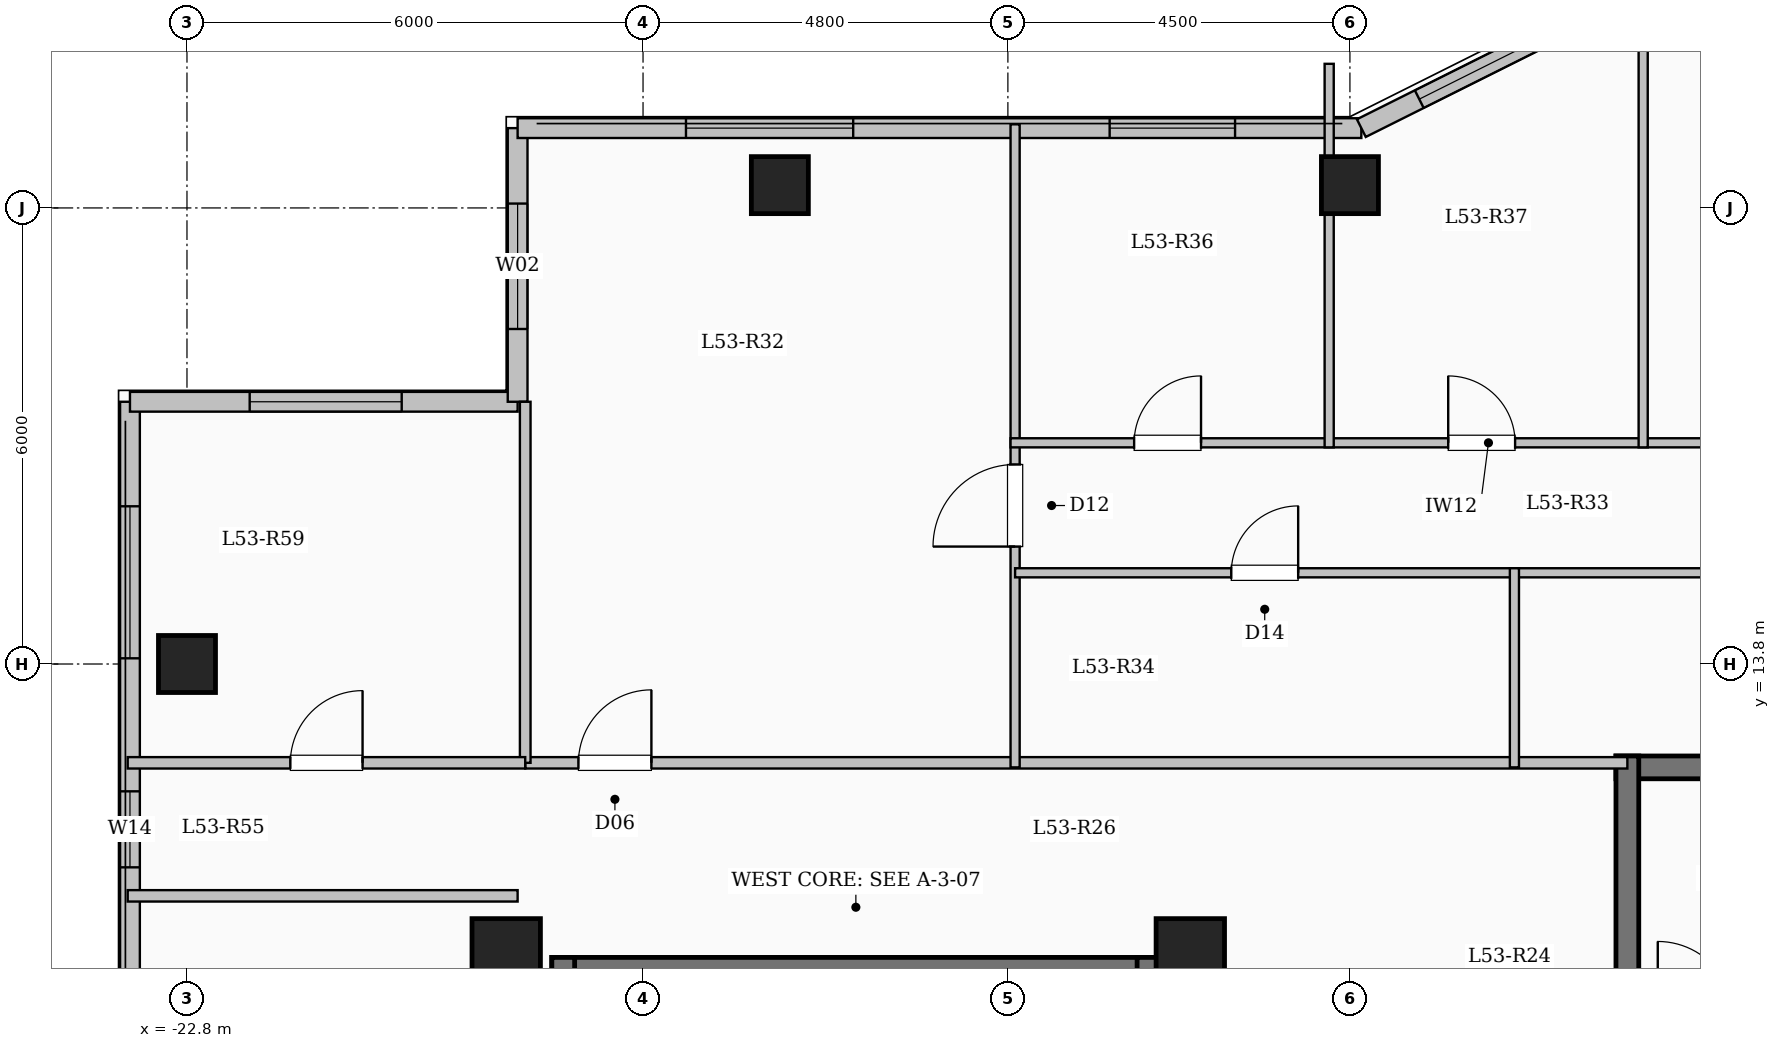
"""IFC4 building model, lengths in metres.
Left out: names, types, materials, properties, quantities, classifications, styles, units other than length and angle.
Written with IfcOpenShell. Run it as: python <this file> out.ifc"""

import sys

from ifc_helpers import new_model, si_unit, direction, frame, frame_2d, origin, origin_2d, place, context, subcontext, project, spatial, rectangle, extrude, element, fill, save


model = new_model("IFC4")
c1 = context("Model", 3, precision=1e-05, world=origin(), true_north=direction((0.0, 1.0)))
c2 = subcontext(c1, "Body", "Model", "MODEL_VIEW")
j1 = project(units=[si_unit("LENGTHUNIT", "METRE"), si_unit("PLANEANGLEUNIT", "RADIAN")], contexts=[c1])
p1 = place(None, origin())
s1 = spatial("IfcSite", under=j1, at=p1, CompositionType="ELEMENT")
p2 = place(p1, origin())
s2 = spatial("IfcBuilding", under=s1, at=p2, CompositionType="ELEMENT")
p3 = place(p2, frame((0.0, 0.0, 196.95)))
s3 = spatial("IfcBuildingStorey", under=s2, at=p3, CompositionType="ELEMENT", Elevation=196.95)
for number, where, z_axis, x_axis in (
    (1, (-9.6, 10.0, 0.0), (0.0, 0.0, 1.0), (1.0, 0.0, 0.0)),
    (2, (-18.6, 10.0, 0.0), (0.0, 0.0, 1.0), (1.0, 0.0, 0.0)),
):
    element("IfcColumn", number, at=place(p3, frame(where, z_axis=z_axis, x_axis=x_axis)), inside=s3, PredefinedType="COLUMN", context=c2, shape_type="SweptSolid", body=[
        extrude(rectangle(XDim=0.9, YDim=0.9, at=origin_2d()), origin(), (0.0, 0.0, 1.0), 3.35),
    ])
for number, where, z_axis, x_axis in (
    (3, (-15.0, 20.1, 0.0), (0.0, 0.0, 1.0), (1.0, 0.0, 0.0)),
    (4, (-7.5, 20.1, 0.0), (0.0, 0.0, 1.0), (1.0, 0.0, 0.0)),
    (5, (-22.8, 13.8, 0.0), (0.0, 0.0, 1.0), (1.0, 0.0, 0.0)),
):
    element("IfcColumn", number, at=place(p3, frame(where, z_axis=z_axis, x_axis=x_axis)), inside=s3, PredefinedType="COLUMN", context=c2, shape_type="SweptSolid", body=[
        extrude(rectangle(XDim=0.75, YDim=0.75, at=origin_2d()), origin(), (0.0, 0.0, 1.0), 3.35),
    ])
p4 = place(p3, frame((-23.55, -17.25, 0.0), z_axis=(0.0, 0.0, 1.0), x_axis=(0.0, 1.0, 0.0)))
e6 = element("IfcWall", 6, at=p4, inside=s3, PredefinedType="SOLIDWALL", context=c2, shape_type="SweptSolid", body=[
    extrude(rectangle(XDim=34.5, YDim=0.26, at=frame_2d((17.25, 0.0))), origin(), (0.0, 0.0, 1.0), 3.1),
])
p5 = place(p4, frame((2.825, 0.0, 0.9)))
e7 = element("IfcOpeningElement", 7, at=p5, cuts=e6, PredefinedType="OPENING", context=c2, shape_type="SweptSolid", body=[
    extrude(rectangle(XDim=2.2, YDim=1.75, at=frame_2d((1.1, 0.875))), frame((0.0, 0.14, 0.0), z_axis=(0.0, -1.0, 0.0), x_axis=(1.0, 0.0, 0.0)), (0.0, 0.0, 1.0), 0.28),
])
p6 = place(p4, frame((8.325, 0.0, 0.95)))
e8 = element("IfcOpeningElement", 8, at=p6, cuts=e6, PredefinedType="OPENING", context=c2, shape_type="SweptSolid", body=[
    extrude(rectangle(XDim=1.2, YDim=1.5, at=frame_2d((0.6, 0.75))), frame((0.0, 0.14, 0.0), z_axis=(0.0, -1.0, 0.0), x_axis=(1.0, 0.0, 0.0)), (0.0, 0.0, 1.0), 0.28),
])
p7 = place(p4, frame((18.0, 0.0, 0.9)))
e9 = element("IfcOpeningElement", 9, at=p7, cuts=e6, PredefinedType="OPENING", context=c2, shape_type="SweptSolid", body=[
    extrude(rectangle(XDim=2.0, YDim=1.7, at=frame_2d((1.0, 0.85))), frame((0.0, 0.14, 0.0), z_axis=(0.0, -1.0, 0.0), x_axis=(1.0, 0.0, 0.0)), (0.0, 0.0, 1.0), 0.28),
])
p8 = place(p4, frame((28.375, 0.0, 0.95)))
e10 = element("IfcOpeningElement", 10, at=p8, cuts=e6, PredefinedType="OPENING", context=c2, shape_type="SweptSolid", body=[
    extrude(rectangle(XDim=1.0, YDim=1.5, at=frame_2d((0.5, 0.75))), frame((0.0, 0.14, 0.0), z_axis=(0.0, -1.0, 0.0), x_axis=(1.0, 0.0, 0.0)), (0.0, 0.0, 1.0), 0.28),
])
p9 = place(p4, frame((31.125, 0.0, 0.9)))
e11 = element("IfcOpeningElement", 11, at=p9, cuts=e6, PredefinedType="OPENING", context=c2, shape_type="SweptSolid", body=[
    extrude(rectangle(XDim=2.0, YDim=1.7, at=frame_2d((1.0, 0.85))), frame((0.0, 0.14, 0.0), z_axis=(0.0, -1.0, 0.0), x_axis=(1.0, 0.0, 0.0)), (0.0, 0.0, 1.0), 0.28),
])
p10 = place(p3, frame((-23.55, 17.25, 0.0), z_axis=(0.0, 0.0, 1.0), x_axis=(1.0, 0.0, 0.0)))
e12 = element("IfcWall", 12, at=p10, inside=s3, PredefinedType="SOLIDWALL", context=c2, shape_type="SweptSolid", body=[
    extrude(rectangle(XDim=5.1, YDim=0.26, at=frame_2d((2.55, 0.0))), origin(), (0.0, 0.0, 1.0), 3.1),
])
p11 = place(p10, frame((1.575, 0.0, 0.9)))
e13 = element("IfcOpeningElement", 13, at=p11, cuts=e12, PredefinedType="OPENING", context=c2, shape_type="SweptSolid", body=[
    extrude(rectangle(XDim=2.0, YDim=1.7, at=frame_2d((1.0, 0.85))), frame((0.0, 0.14, 0.0), z_axis=(0.0, -1.0, 0.0), x_axis=(1.0, 0.0, 0.0)), (0.0, 0.0, 1.0), 0.28),
])
p12 = place(p3, frame((-18.45, 17.25, 0.0), z_axis=(0.0, 0.0, 1.0), x_axis=(0.0, 1.0, 0.0)))
e14 = element("IfcWall", 14, at=p12, inside=s3, PredefinedType="SOLIDWALL", context=c2, shape_type="SweptSolid", body=[
    extrude(rectangle(XDim=3.6, YDim=0.26, at=frame_2d((1.8, 0.0))), origin(), (0.0, 0.0, 1.0), 3.1),
])
p13 = place(p12, frame((0.958, 0.0, 0.9)))
e15 = element("IfcOpeningElement", 15, at=p13, cuts=e14, PredefinedType="OPENING", context=c2, shape_type="SweptSolid", body=[
    extrude(rectangle(XDim=1.65, YDim=1.6, at=frame_2d((0.825, 0.8))), frame((0.0, 0.14, 0.0), z_axis=(0.0, -1.0, 0.0), x_axis=(1.0, 0.0, 0.0)), (0.0, 0.0, 1.0), 0.28),
])
p14 = place(p3, frame((-18.45, 20.85, 0.0), z_axis=(0.0, 0.0, 1.0), x_axis=(1.0, 0.0, 0.0)))
e16 = element("IfcWall", 16, at=p14, inside=s3, PredefinedType="SOLIDWALL", context=c2, shape_type="SweptSolid", body=[
    extrude(rectangle(XDim=11.1, YDim=0.26, at=frame_2d((5.55, 0.0))), origin(), (0.0, 0.0, 1.0), 3.1),
])
p15 = place(p14, frame((2.215, 0.0, 0.9)))
e17 = element("IfcOpeningElement", 17, at=p15, cuts=e16, PredefinedType="OPENING", context=c2, shape_type="SweptSolid", body=[
    extrude(rectangle(XDim=2.2, YDim=1.75, at=frame_2d((1.1, 0.875))), frame((0.0, 0.14, 0.0), z_axis=(0.0, -1.0, 0.0), x_axis=(1.0, 0.0, 0.0)), (0.0, 0.0, 1.0), 0.28),
])
p16 = place(p14, frame((7.789, 0.0, 0.9)))
e18 = element("IfcOpeningElement", 18, at=p16, cuts=e16, PredefinedType="OPENING", context=c2, shape_type="SweptSolid", body=[
    extrude(rectangle(XDim=1.65, YDim=1.6, at=frame_2d((0.825, 0.8))), frame((0.0, 0.14, 0.0), z_axis=(0.0, -1.0, 0.0), x_axis=(1.0, 0.0, 0.0)), (0.0, 0.0, 1.0), 0.28),
])
p17 = place(p3, frame((-7.35, 20.85, 0.0), z_axis=(0.0, 0.0, 1.0), x_axis=(0.894427191, 0.4472135955, 0.0)))
e19 = element("IfcWall", 19, at=p17, inside=s3, PredefinedType="SOLIDWALL", context=c2, shape_type="SweptSolid", body=[
    extrude(rectangle(XDim=3.354, YDim=0.26, at=frame_2d((1.677, 0.0))), origin(), (0.0, 0.0, 1.0), 3.1),
])
p18 = place(p17, frame((0.852, 0.0, 0.9)))
e20 = element("IfcOpeningElement", 20, at=p18, cuts=e19, PredefinedType="OPENING", context=c2, shape_type="SweptSolid", body=[
    extrude(rectangle(XDim=1.65, YDim=1.6, at=frame_2d((0.825, 0.8))), frame((0.0, 0.14, 0.0), z_axis=(0.0, -1.0, 0.0), x_axis=(1.0, 0.0, 0.0)), (0.0, 0.0, 1.0), 0.28),
])
p19 = place(p3, frame((-18.0, 9.79, 0.0), z_axis=(0.0, 0.0, 1.0), x_axis=(1.0, 0.0, 0.0)))
e21 = element("IfcWall", 21, at=p19, inside=s3, PredefinedType="SHEAR", context=c2, shape_type="SweptSolid", body=[
    extrude(rectangle(XDim=8.0, YDim=0.3, at=frame_2d((4.0, 0.0))), origin(), (0.0, 0.0, 1.0), 3.35),
])
for number, where, z_axis, x_axis in (
    (22, (-17.85, 6.35, 0.0), (0.0, 0.0, 1.0), (0.0, 1.0, 0.0)),
    (23, (-10.15, 6.35, 0.0), (0.0, 0.0, 1.0), (0.0, 1.0, 0.0)),
):
    element("IfcWall", number, at=place(p3, frame(where, z_axis=z_axis, x_axis=x_axis)), inside=s3, PredefinedType="SHEAR", context=c2, shape_type="SweptSolid", body=[
        extrude(rectangle(XDim=3.59, YDim=0.3, at=frame_2d((1.795, 0.0))), origin(), (0.0, 0.0, 1.0), 3.35),
    ])
p20 = place(p3, frame((-4.0, 12.44, 0.0), z_axis=(0.0, 0.0, 1.0), x_axis=(1.0, 0.0, 0.0)))
e24 = element("IfcWall", 24, at=p20, inside=s3, PredefinedType="SHEAR", context=c2, shape_type="SweptSolid", body=[
    extrude(rectangle(XDim=8.0, YDim=0.3, at=frame_2d((4.0, 0.0))), origin(), (0.0, 0.0, 1.0), 3.35),
])
p21 = place(p3, frame((-3.85, 9.0, 0.0), z_axis=(0.0, 0.0, 1.0), x_axis=(0.0, 1.0, 0.0)))
e25 = element("IfcWall", 25, at=p21, inside=s3, PredefinedType="SHEAR", context=c2, shape_type="SweptSolid", body=[
    extrude(rectangle(XDim=3.59, YDim=0.3, at=frame_2d((1.795, 0.0))), origin(), (0.0, 0.0, 1.0), 3.35),
])
p22 = place(p3, frame((-18.35, 12.5, 0.0), z_axis=(0.0, 0.0, 1.0), x_axis=(1.0, 0.0, 0.0)))
e26 = element("IfcWall", 26, at=p22, inside=s3, PredefinedType="PARTITIONING", context=c2, shape_type="SweptSolid", body=[
    extrude(rectangle(XDim=14.5, YDim=0.15, at=frame_2d((7.25, 0.0))), origin(), (0.0, 0.0, 1.0), 3.1),
])
p23 = place(p22, frame((0.7, 0.0, 0.0)))
e27 = element("IfcOpeningElement", 27, at=p23, cuts=e26, PredefinedType="OPENING", context=c2, shape_type="SweptSolid", body=[
    extrude(rectangle(XDim=0.96, YDim=2.15, at=frame_2d((0.48, 1.075))), frame((0.0, 0.085, 0.0), z_axis=(0.0, -1.0, 0.0), x_axis=(1.0, 0.0, 0.0)), (0.0, 0.0, 1.0), 0.17),
])
p24 = place(p3, frame((-11.905, 12.44, 0.0), z_axis=(0.0, 0.0, 1.0), x_axis=(0.0, 1.0, 0.0)))
e28 = element("IfcWall", 28, at=p24, inside=s3, PredefinedType="PARTITIONING", context=c2, shape_type="SweptSolid", body=[
    extrude(rectangle(XDim=8.46, YDim=0.12, at=frame_2d((4.23, 0.0))), origin(), (0.0, 0.0, 1.0), 3.1),
])
p25 = place(p24, frame((2.905, 0.0, 0.0)))
e29 = element("IfcOpeningElement", 29, at=p25, cuts=e28, PredefinedType="OPENING", context=c2, shape_type="SweptSolid", body=[
    extrude(rectangle(XDim=1.08, YDim=2.15, at=frame_2d((0.54, 1.075))), frame((0.0, 0.07, 0.0), z_axis=(0.0, -1.0, 0.0), x_axis=(1.0, 0.0, 0.0)), (0.0, 0.0, 1.0), 0.14),
])
p26 = place(p3, frame((-11.905, 15.0, 0.0), z_axis=(0.0, 0.0, 1.0), x_axis=(1.0, 0.0, 0.0)))
e30 = element("IfcWall", 30, at=p26, inside=s3, PredefinedType="PARTITIONING", context=c2, shape_type="SweptSolid", body=[
    extrude(rectangle(XDim=6.569, YDim=0.12, at=frame_2d((3.285, 0.0))), origin(), (0.0, 0.0, 1.0), 3.1),
])
p27 = place(p26, frame((2.844, 0.0, 0.0)))
e31 = element("IfcOpeningElement", 31, at=p27, cuts=e30, PredefinedType="OPENING", context=c2, shape_type="SweptSolid", body=[
    extrude(rectangle(XDim=0.88, YDim=2.1, at=frame_2d((0.44, 1.05))), frame((0.0, 0.07, 0.0), z_axis=(0.0, -1.0, 0.0), x_axis=(1.0, 0.0, 0.0)), (0.0, 0.0, 1.0), 0.14),
])
p28 = place(p3, frame((-5.336, 15.0, 0.0), z_axis=(0.0, 0.0, 1.0), x_axis=(1.0, 0.0, 0.0)))
e32 = element("IfcWall", 32, at=p28, inside=s3, PredefinedType="PARTITIONING", context=c2, shape_type="SweptSolid", body=[
    extrude(rectangle(XDim=5.886, YDim=0.12, at=frame_2d((2.943, 0.0))), origin(), (0.0, 0.0, 1.0), 3.1),
])
p29 = place(p28, frame((2.503, 0.0, 0.0)))
e33 = element("IfcOpeningElement", 33, at=p29, cuts=e32, PredefinedType="OPENING", context=c2, shape_type="SweptSolid", body=[
    extrude(rectangle(XDim=0.88, YDim=2.1, at=frame_2d((0.44, 1.05))), frame((0.0, 0.07, 0.0), z_axis=(0.0, -1.0, 0.0), x_axis=(1.0, 0.0, 0.0)), (0.0, 0.0, 1.0), 0.14),
])
p30 = place(p3, frame((-11.965, 16.71, 0.0), z_axis=(0.0, 0.0, 1.0), x_axis=(1.0, 0.0, 0.0)))
e34 = element("IfcWall", 34, at=p30, inside=s3, PredefinedType="PARTITIONING", context=c2, shape_type="SweptSolid", body=[
    extrude(rectangle(XDim=12.575, YDim=0.12, at=frame_2d((6.288, 0.0))), origin(), (0.0, 0.0, 1.0), 2.725),
])
p31 = place(p30, frame((1.626, 0.0, 0.0)))
e35 = element("IfcOpeningElement", 35, at=p31, cuts=e34, PredefinedType="OPENING", context=c2, shape_type="SweptSolid", body=[
    extrude(rectangle(XDim=0.88, YDim=2.1, at=frame_2d((0.44, 1.05))), frame((0.0, 0.07, 0.0), z_axis=(0.0, -1.0, 0.0), x_axis=(1.0, 0.0, 0.0)), (0.0, 0.0, 1.0), 0.14),
])
p32 = place(p30, frame((5.758, 0.0, 0.0)))
e36 = element("IfcOpeningElement", 36, at=p32, cuts=e34, PredefinedType="OPENING", context=c2, shape_type="SweptSolid", body=[
    extrude(rectangle(XDim=0.88, YDim=2.1, at=frame_2d((0.44, 1.05))), frame((0.0, 0.07, 0.0), z_axis=(0.0, -1.0, 0.0), x_axis=(1.0, 0.0, 0.0)), (0.0, 0.0, 1.0), 0.14),
])
p33 = place(p30, frame((9.889, 0.0, 0.0)))
e37 = element("IfcOpeningElement", 37, at=p33, cuts=e34, PredefinedType="OPENING", context=c2, shape_type="SweptSolid", body=[
    extrude(rectangle(XDim=0.88, YDim=2.1, at=frame_2d((0.44, 1.05))), frame((0.0, 0.07, 0.0), z_axis=(0.0, -1.0, 0.0), x_axis=(1.0, 0.0, 0.0)), (0.0, 0.0, 1.0), 0.14),
])
p34 = place(p3, frame((-5.336, 12.44, 0.0), z_axis=(0.0, 0.0, 1.0), x_axis=(0.0, 1.0, 0.0)))
e38 = element("IfcWall", 38, at=p34, inside=s3, PredefinedType="PARTITIONING", context=c2, shape_type="SweptSolid", body=[
    extrude(rectangle(XDim=2.62, YDim=0.12, at=frame_2d((1.31, 0.0))), origin(), (0.0, 0.0, 1.0), 3.1),
])
p35 = place(p3, frame((-7.773, 16.65, 0.0), z_axis=(0.0, 0.0, 1.0), x_axis=(0.0, 1.0, 0.0)))
e39 = element("IfcWall", 39, at=p35, inside=s3, PredefinedType="PARTITIONING", context=c2, shape_type="SweptSolid", body=[
    extrude(rectangle(XDim=5.046, YDim=0.12, at=frame_2d((2.523, 0.0))), origin(), (0.0, 0.0, 1.0), 2.585),
])
p36 = place(p3, frame((-3.642, 16.65, 0.0), z_axis=(0.0, 0.0, 1.0), x_axis=(0.0, 1.0, 0.0)))
e40 = element("IfcWall", 40, at=p36, inside=s3, PredefinedType="PARTITIONING", context=c2, shape_type="SweptSolid", body=[
    extrude(rectangle(XDim=5.73, YDim=0.12, at=frame_2d((2.865, 0.0))), origin(), (0.0, 0.0, 1.0), 3.1),
])
p37 = place(p3, frame((-23.58, 10.75, 0.0), z_axis=(0.0, 0.0, 1.0), x_axis=(1.0, 0.0, 0.0)))
e41 = element("IfcWall", 41, at=p37, inside=s3, PredefinedType="PARTITIONING", context=c2, shape_type="SweptSolid", body=[
    extrude(rectangle(XDim=5.13, YDim=0.15, at=frame_2d((2.565, 0.0))), origin(), (0.0, 0.0, 1.0), 3.1),
])
p38 = place(p3, frame((-18.35, 12.5, 0.0), z_axis=(0.0, 0.0, 1.0), x_axis=(0.0, 1.0, 0.0)))
e42 = element("IfcWall", 42, at=p38, inside=s3, PredefinedType="PARTITIONING", context=c2, shape_type="SweptSolid", body=[
    extrude(rectangle(XDim=4.75, YDim=0.14, at=frame_2d((2.375, 0.0))), origin(), (0.0, 0.0, 1.0), 3.1),
])
p39 = place(p3, frame((-23.58, 12.5, 0.0), z_axis=(0.0, 0.0, 1.0), x_axis=(1.0, 0.0, 0.0)))
e43 = element("IfcWall", 43, at=p39, inside=s3, PredefinedType="PARTITIONING", context=c2, shape_type="SweptSolid", body=[
    extrude(rectangle(XDim=5.23, YDim=0.15, at=frame_2d((2.615, 0.0))), origin(), (0.0, 0.0, 1.0), 3.1),
])
p40 = place(p39, frame((2.14, 0.0, 0.0)))
e44 = element("IfcOpeningElement", 44, at=p40, cuts=e43, PredefinedType="OPENING", context=c2, shape_type="SweptSolid", body=[
    extrude(rectangle(XDim=0.95, YDim=2.15, at=frame_2d((0.475, 1.075))), frame((0.0, 0.085, 0.0), z_axis=(0.0, -1.0, 0.0), x_axis=(1.0, 0.0, 0.0)), (0.0, 0.0, 1.0), 0.17),
])
p41 = place(p8, origin())
e45 = element("IfcWindow", 45, at=p41, inside=s3, PartitioningType="SINGLE_PANEL", PredefinedType="WINDOW", context=c2, shape_type="SweptSolid", body=[
    extrude(rectangle(XDim=1.0, YDim=1.5, at=frame_2d((0.5, 0.75))), frame((0.0, 0.03, 0.0), z_axis=(0.0, -1.0, 0.0), x_axis=(1.0, 0.0, 0.0)), (0.0, 0.0, 1.0), 0.06),
])
fill(e10, e45)
p42 = place(p9, origin())
e46 = element("IfcWindow", 46, at=p42, inside=s3, PartitioningType="SINGLE_PANEL", PredefinedType="WINDOW", context=c2, shape_type="SweptSolid", body=[
    extrude(rectangle(XDim=2.0, YDim=1.7, at=frame_2d((1.0, 0.85))), frame((0.0, 0.03, 0.0), z_axis=(0.0, -1.0, 0.0), x_axis=(1.0, 0.0, 0.0)), (0.0, 0.0, 1.0), 0.06),
])
fill(e11, e46)
p43 = place(p11, origin())
e47 = element("IfcWindow", 47, at=p43, inside=s3, PartitioningType="SINGLE_PANEL", PredefinedType="WINDOW", context=c2, shape_type="SweptSolid", body=[
    extrude(rectangle(XDim=2.0, YDim=1.7, at=frame_2d((1.0, 0.85))), frame((0.0, 0.03, 0.0), z_axis=(0.0, -1.0, 0.0), x_axis=(1.0, 0.0, 0.0)), (0.0, 0.0, 1.0), 0.06),
])
fill(e13, e47)
p44 = place(p13, origin())
e48 = element("IfcWindow", 48, at=p44, inside=s3, PartitioningType="SINGLE_PANEL", PredefinedType="WINDOW", context=c2, shape_type="SweptSolid", body=[
    extrude(rectangle(XDim=1.65, YDim=1.6, at=frame_2d((0.825, 0.8))), frame((0.0, 0.03, 0.0), z_axis=(0.0, -1.0, 0.0), x_axis=(1.0, 0.0, 0.0)), (0.0, 0.0, 1.0), 0.06),
])
fill(e15, e48)
p45 = place(p15, origin())
e49 = element("IfcWindow", 49, at=p45, inside=s3, PartitioningType="SINGLE_PANEL", PredefinedType="WINDOW", context=c2, shape_type="SweptSolid", body=[
    extrude(rectangle(XDim=2.2, YDim=1.75, at=frame_2d((1.1, 0.875))), frame((0.0, 0.03, 0.0), z_axis=(0.0, -1.0, 0.0), x_axis=(1.0, 0.0, 0.0)), (0.0, 0.0, 1.0), 0.06),
])
fill(e17, e49)
p46 = place(p16, origin())
e50 = element("IfcWindow", 50, at=p46, inside=s3, PartitioningType="SINGLE_PANEL", PredefinedType="WINDOW", context=c2, shape_type="SweptSolid", body=[
    extrude(rectangle(XDim=1.65, YDim=1.6, at=frame_2d((0.825, 0.8))), frame((0.0, 0.03, 0.0), z_axis=(0.0, -1.0, 0.0), x_axis=(1.0, 0.0, 0.0)), (0.0, 0.0, 1.0), 0.06),
])
fill(e18, e50)
p47 = place(p18, origin())
e51 = element("IfcWindow", 51, at=p47, inside=s3, PartitioningType="SINGLE_PANEL", PredefinedType="WINDOW", context=c2, shape_type="SweptSolid", body=[
    extrude(rectangle(XDim=1.65, YDim=1.6, at=frame_2d((0.825, 0.8))), frame((0.0, 0.03, 0.0), z_axis=(0.0, -1.0, 0.0), x_axis=(1.0, 0.0, 0.0)), (0.0, 0.0, 1.0), 0.06),
])
fill(e20, e51)
p48 = place(p23, origin())
e52 = element("IfcDoor", 52, at=p48, inside=s3, OperationType="SINGLE_SWING_RIGHT", PredefinedType="DOOR", context=c2, shape_type="SweptSolid", body=[
    extrude(rectangle(XDim=0.96, YDim=2.15, at=frame_2d((0.48, 1.075))), frame((0.0, 0.025, 0.0), z_axis=(0.0, -1.0, 0.0), x_axis=(1.0, 0.0, 0.0)), (0.0, 0.0, 1.0), 0.05),
])
fill(e27, e52)
p49 = place(p25, origin())
e53 = element("IfcDoor", 53, at=p49, inside=s3, OperationType="SINGLE_SWING_LEFT", PredefinedType="DOOR", context=c2, shape_type="SweptSolid", body=[
    extrude(rectangle(XDim=1.08, YDim=2.15, at=frame_2d((0.54, 1.075))), frame((0.0, 0.025, 0.0), z_axis=(0.0, -1.0, 0.0), x_axis=(1.0, 0.0, 0.0)), (0.0, 0.0, 1.0), 0.05),
])
fill(e29, e53)
p50 = place(p27, origin())
e54 = element("IfcDoor", 54, at=p50, inside=s3, OperationType="SINGLE_SWING_RIGHT", PredefinedType="DOOR", context=c2, shape_type="SweptSolid", body=[
    extrude(rectangle(XDim=0.88, YDim=2.1, at=frame_2d((0.44, 1.05))), frame((0.0, 0.025, 0.0), z_axis=(0.0, -1.0, 0.0), x_axis=(1.0, 0.0, 0.0)), (0.0, 0.0, 1.0), 0.05),
])
fill(e31, e54)
p51 = place(p31, origin())
e55 = element("IfcDoor", 55, at=p51, inside=s3, OperationType="SINGLE_SWING_RIGHT", PredefinedType="DOOR", context=c2, shape_type="SweptSolid", body=[
    extrude(rectangle(XDim=0.88, YDim=2.1, at=frame_2d((0.44, 1.05))), frame((0.0, 0.025, 0.0), z_axis=(0.0, -1.0, 0.0), x_axis=(1.0, 0.0, 0.0)), (0.0, 0.0, 1.0), 0.05),
])
fill(e35, e55)
p52 = place(p32, origin())
e56 = element("IfcDoor", 56, at=p52, inside=s3, OperationType="SINGLE_SWING_LEFT", PredefinedType="DOOR", context=c2, shape_type="SweptSolid", body=[
    extrude(rectangle(XDim=0.88, YDim=2.1, at=frame_2d((0.44, 1.05))), frame((0.0, 0.025, 0.0), z_axis=(0.0, -1.0, 0.0), x_axis=(1.0, 0.0, 0.0)), (0.0, 0.0, 1.0), 0.05),
])
fill(e36, e56)
p53 = place(p40, origin())
e57 = element("IfcDoor", 57, at=p53, inside=s3, OperationType="SINGLE_SWING_RIGHT", PredefinedType="DOOR", context=c2, shape_type="SweptSolid", body=[
    extrude(rectangle(XDim=0.95, YDim=2.15, at=frame_2d((0.475, 1.075))), frame((0.0, 0.025, 0.0), z_axis=(0.0, -1.0, 0.0), x_axis=(1.0, 0.0, 0.0)), (0.0, 0.0, 1.0), 0.05),
])
fill(e44, e57)
save(model, sys.argv[1])
